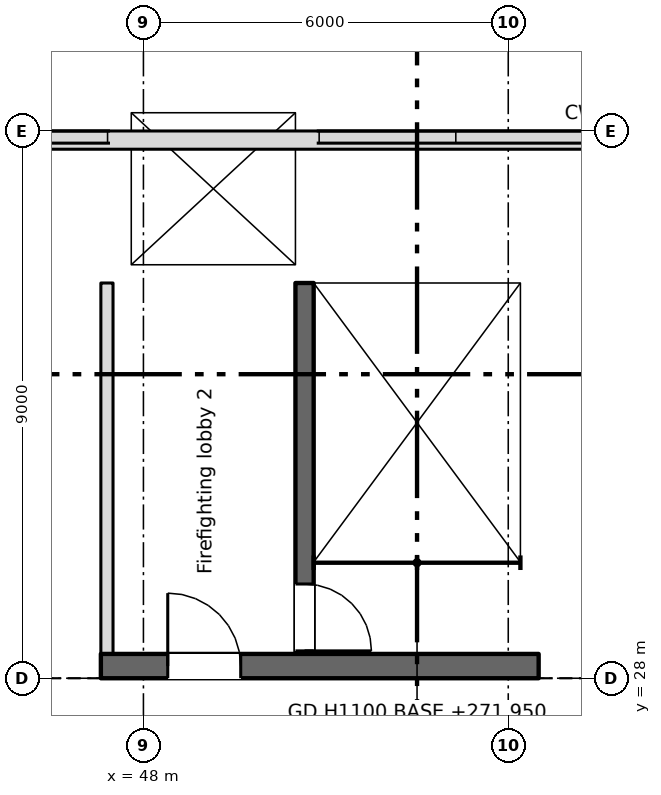
"""IFC4 building model, lengths in metres.
Left out: names, types, materials, properties, quantities, classifications, styles, units other than length and angle.
Written with IfcOpenShell. Run it as: python <this file> out.ifc"""

import sys

from ifc_helpers import new_model, si_unit, direction, frame, frame_2d, origin, place, context, subcontext, project, spatial, rectangle, extrude, element, fill, save


model = new_model("IFC4")
c1 = context("Model", 3, precision=1e-05, world=origin(), true_north=direction((0.0, 1.0)))
c2 = subcontext(c1, "Body", "Model", "MODEL_VIEW")
j1 = project(units=[si_unit("LENGTHUNIT", "METRE"), si_unit("PLANEANGLEUNIT", "RADIAN")], contexts=[c1])
p1 = place(None, origin())
s1 = spatial("IfcSite", under=j1, at=p1, CompositionType="ELEMENT")
p2 = place(p1, origin())
s2 = spatial("IfcBuilding", under=s1, at=p2, CompositionType="ELEMENT")
p3 = place(p2, frame((0.0, 0.0, 271.95)))
s3 = spatial("IfcBuildingStorey", under=s2, at=p3, CompositionType="ELEMENT", Elevation=271.95)
p4 = place(p3, frame((12.0, 36.85, 6.0), z_axis=(0.0, 0.0, 1.0), x_axis=(1.0, 0.0, 0.0)))
e1 = element("IfcWall", 1, at=p4, inside=s3, PredefinedType="PARAPET", context=c2, shape_type="SweptSolid", body=[
    extrude(rectangle(XDim=48.0, YDim=0.3, at=frame_2d((24.0, 0.0))), origin(), (0.0, 0.0, 1.0), 1.1),
])
p5 = place(p3, frame((50.65, 34.5, 0.0), z_axis=(0.0, 0.0, 1.0), x_axis=(0.0, -1.0, 0.0)))
e2 = element("IfcWall", 2, at=p5, inside=s3, PredefinedType="SHEAR", context=c2, shape_type="SweptSolid", body=[
    extrude(rectangle(XDim=6.1, YDim=0.3, at=frame_2d((3.05, 0.0))), origin(), (0.0, 0.0, 1.0), 5.5),
])
p6 = place(p5, frame((4.95, 0.0, 0.0)))
e3 = element("IfcOpeningElement", 3, at=p6, cuts=e2, PredefinedType="OPENING", context=c2, shape_type="SweptSolid", body=[
    extrude(rectangle(XDim=1.1, YDim=2.1, at=frame_2d((0.55, 1.05))), frame((0.0, 0.16, 0.0), z_axis=(0.0, -1.0, 0.0), x_axis=(1.0, 0.0, 0.0)), (0.0, 0.0, 1.0), 0.32),
])
p7 = place(p3, frame((54.35, 28.4, 0.0), z_axis=(0.0, 0.0, 1.0), x_axis=(0.0, 1.0, 0.0)))
e4 = element("IfcWall", 4, at=p7, inside=s3, PredefinedType="SHEAR", context=c2, shape_type="SweptSolid", body=[
    extrude(rectangle(XDim=6.1, YDim=0.3, at=frame_2d((3.05, 0.0))), origin(), (0.0, 0.0, 1.0), 5.5),
])
p8 = place(p3, frame((47.3, 28.2, 0.0), z_axis=(0.0, 0.0, 1.0), x_axis=(1.0, 0.0, 0.0)))
e5 = element("IfcWall", 5, at=p8, inside=s3, PredefinedType="SHEAR", context=c2, shape_type="SweptSolid", body=[
    extrude(rectangle(XDim=7.2, YDim=0.4, at=frame_2d((3.6, 0.0))), origin(), (0.0, 0.0, 1.0), 5.5),
])
p9 = place(p8, frame((1.1, 0.0, 0.0)))
e6 = element("IfcOpeningElement", 6, at=p9, cuts=e5, PredefinedType="OPENING", context=c2, shape_type="SweptSolid", body=[
    extrude(rectangle(XDim=1.2, YDim=2.1, at=frame_2d((0.6, 1.05))), frame((0.0, 0.21, 0.0), z_axis=(0.0, -1.0, 0.0), x_axis=(1.0, 0.0, 0.0)), (0.0, 0.0, 1.0), 0.42),
])
p10 = place(p3, frame((47.3, 34.65, 0.0), z_axis=(0.0, 0.0, 1.0), x_axis=(1.0, 0.0, 0.0)))
e7 = element("IfcWall", 7, at=p10, inside=s3, PredefinedType="SHEAR", context=c2, shape_type="SweptSolid", body=[
    extrude(rectangle(XDim=7.2, YDim=0.3, at=frame_2d((3.6, 0.0))), origin(), (0.0, 0.0, 1.0), 5.5),
])
p11 = place(p10, frame((1.3, 0.0, 0.0)))
e8 = element("IfcOpeningElement", 8, at=p11, cuts=e7, PredefinedType="OPENING", context=c2, shape_type="SweptSolid", body=[
    extrude(rectangle(XDim=1.1, YDim=2.1, at=frame_2d((0.55, 1.05))), frame((0.0, 0.16, 0.0), z_axis=(0.0, -1.0, 0.0), x_axis=(1.0, 0.0, 0.0)), (0.0, 0.0, 1.0), 0.32),
])
p12 = place(p3, frame((47.4, 28.4, 0.0), z_axis=(0.0, 0.0, 1.0), x_axis=(0.0, 1.0, 0.0)))
e9 = element("IfcWall", 9, at=p12, inside=s3, PredefinedType="PARTITIONING", context=c2, shape_type="SweptSolid", body=[
    extrude(rectangle(XDim=6.1, YDim=0.2, at=frame_2d((3.05, 0.0))), origin(), (0.0, 0.0, 1.0), 5.5),
])
p13 = place(p3, frame((47.5, 37.45, 0.0), z_axis=(0.0, 0.0, 1.0), x_axis=(1.0, 0.0, 0.0)))
e10 = element("IfcWall", 10, at=p13, inside=s3, PredefinedType="SHEAR", context=c2, shape_type="SweptSolid", body=[
    extrude(rectangle(XDim=3.3, YDim=0.3, at=frame_2d((1.65, 0.0))), origin(), (0.0, 0.0, 1.0), 5.5),
])
for number, where, z_axis, x_axis in (
    (11, (47.65, 34.8, 0.0), (0.0, 0.0, 1.0), (0.0, 1.0, 0.0)),
    (12, (50.65, 34.8, 0.0), (0.0, 0.0, 1.0), (0.0, 1.0, 0.0)),
):
    element("IfcWall", number, at=place(p3, frame(where, z_axis=z_axis, x_axis=x_axis)), inside=s3, PredefinedType="SHEAR", context=c2, shape_type="SweptSolid", body=[
        extrude(rectangle(XDim=2.5, YDim=0.3, at=frame_2d((1.25, 0.0))), origin(), (0.0, 0.0, 1.0), 5.5),
    ])
p14 = place(p6, origin())
e13 = element("IfcDoor", 13, at=p14, inside=s3, OperationType="SINGLE_SWING_RIGHT", PredefinedType="DOOR", context=c2, shape_type="SweptSolid", body=[
    extrude(rectangle(XDim=1.1, YDim=2.1, at=frame_2d((0.55, 1.05))), frame((0.0, 0.025, 0.0), z_axis=(0.0, -1.0, 0.0), x_axis=(1.0, 0.0, 0.0)), (0.0, 0.0, 1.0), 0.05),
])
fill(e3, e13)
p15 = place(p9, origin())
e14 = element("IfcDoor", 14, at=p15, inside=s3, OperationType="SINGLE_SWING_LEFT", PredefinedType="DOOR", context=c2, shape_type="SweptSolid", body=[
    extrude(rectangle(XDim=1.2, YDim=2.1, at=frame_2d((0.6, 1.05))), frame((0.0, 0.025, 0.0), z_axis=(0.0, -1.0, 0.0), x_axis=(1.0, 0.0, 0.0)), (0.0, 0.0, 1.0), 0.05),
])
fill(e6, e14)
p16 = place(p11, origin())
e15 = element("IfcDoor", 15, at=p16, inside=s3, OperationType="SLIDING_TO_LEFT", PredefinedType="DOOR", context=c2, shape_type="SweptSolid", body=[
    extrude(rectangle(XDim=1.1, YDim=2.1, at=frame_2d((0.55, 1.05))), frame((0.0, 0.025, 0.0), z_axis=(0.0, -1.0, 0.0), x_axis=(1.0, 0.0, 0.0)), (0.0, 0.0, 1.0), 0.05),
])
fill(e8, e15)
save(model, sys.argv[1])
